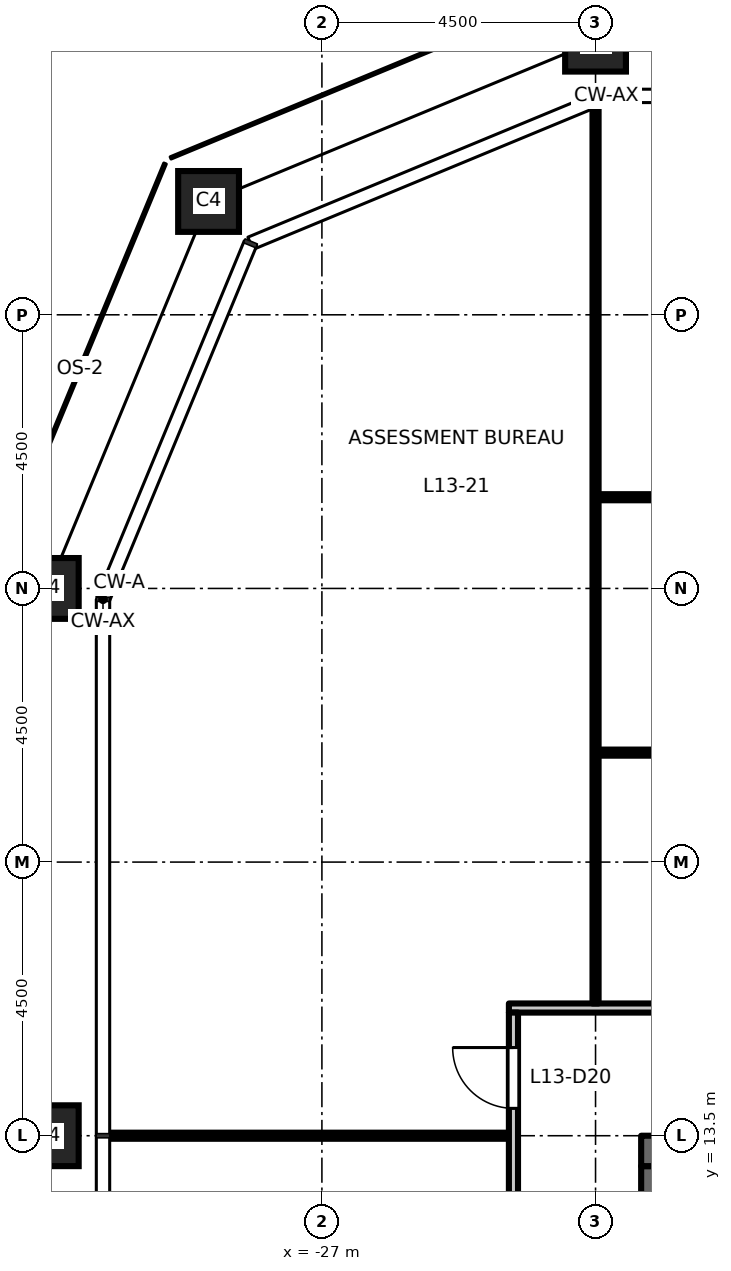
"""IFC4 building model, lengths in metres.
Left out: names, types, materials, properties, quantities, classifications, styles, units other than length and angle.
Written with IfcOpenShell. Run it as: python <this file> out.ifc"""

import sys

from ifc_helpers import new_model, si_unit, direction, frame, frame_2d, origin, origin_2d, place, context, subcontext, project, spatial, rectangle, hollow_rectangle, extrude, element, fill, save


model = new_model("IFC4")
c1 = context("Model", 3, precision=1e-05, world=origin(), true_north=direction((0.0, 1.0)))
c2 = subcontext(c1, "Body", "Model", "MODEL_VIEW")
j1 = project(units=[si_unit("LENGTHUNIT", "METRE"), si_unit("PLANEANGLEUNIT", "RADIAN")], contexts=[c1])
p1 = place(None, origin())
s1 = spatial("IfcSite", under=j1, at=p1, CompositionType="ELEMENT")
p2 = place(p1, origin())
s2 = spatial("IfcBuilding", under=s1, at=p2, CompositionType="ELEMENT")
p3 = place(p2, frame((0.0, 0.0, 62.7)))
s3 = spatial("IfcBuildingStorey", under=s2, at=p3, CompositionType="ELEMENT", Elevation=62.7)
for number, where, z_axis, x_axis in (
    (1, (-22.5, 31.5, 0.0), (0.0, 0.0, 1.0), (1.0, 0.0, 0.0)),
    (2, (-28.864, 28.864, 0.0), (0.0, 0.0, 1.0), (1.0, 0.0, 0.0)),
    (3, (-31.5, 22.5, 0.0), (0.0, 0.0, 1.0), (1.0, 0.0, 0.0)),
    (4, (-31.5, 13.5, 0.0), (0.0, 0.0, 1.0), (1.0, 0.0, 0.0)),
):
    element("IfcColumn", number, at=place(p3, frame(where, z_axis=z_axis, x_axis=x_axis)), inside=s3, PredefinedType="COLUMN", context=c2, shape_type="SweptSolid", body=[
        extrude(hollow_rectangle(XDim=1.0, YDim=1.0, WallThickness=0.06, at=origin_2d()), origin(), (0.0, 0.0, 1.0), 4.5),
    ])
p4 = place(p3, frame((-21.5, -13.0, 0.0), z_axis=(0.0, 0.0, 1.0), x_axis=(0.0, 1.0, 0.0)))
e5 = element("IfcWall", 5, at=p4, inside=s3, PredefinedType="SHEAR", context=c2, shape_type="SweptSolid", body=[
    extrude(rectangle(XDim=26.0, YDim=0.5, at=frame_2d((13.0, 0.0))), origin(), (0.0, 0.0, 1.0), 4.35),
])
p5 = place(p4, frame((16.825, 0.0, 0.0)))
e6 = element("IfcOpeningElement", 6, at=p5, cuts=e5, PredefinedType="OPENING", context=c2, shape_type="SweptSolid", body=[
    extrude(rectangle(XDim=1.8, YDim=2.1, at=frame_2d((0.9, 1.05))), frame((0.0, 0.26, 0.0), z_axis=(0.0, -1.0, 0.0), x_axis=(1.0, 0.0, 0.0)), (0.0, 0.0, 1.0), 0.52),
])
p6 = place(p4, frame((7.375, 0.0, 0.0)))
e7 = element("IfcOpeningElement", 7, at=p6, cuts=e5, PredefinedType="OPENING", context=c2, shape_type="SweptSolid", body=[
    extrude(rectangle(XDim=1.8, YDim=2.1, at=frame_2d((0.9, 1.05))), frame((0.0, 0.26, 0.0), z_axis=(0.0, -1.0, 0.0), x_axis=(1.0, 0.0, 0.0)), (0.0, 0.0, 1.0), 0.52),
])
p7 = place(p4, frame((23.4, 0.0, 0.0)))
e8 = element("IfcOpeningElement", 8, at=p7, cuts=e5, PredefinedType="OPENING", context=c2, shape_type="SweptSolid", body=[
    extrude(rectangle(XDim=0.9, YDim=2.1, at=frame_2d((0.45, 1.05))), frame((0.0, 0.26, 0.0), z_axis=(0.0, -1.0, 0.0), x_axis=(1.0, 0.0, 0.0)), (0.0, 0.0, 1.0), 0.52),
])
p8 = place(p3, frame((-8.25, 13.25, 0.0), z_axis=(0.0, 0.0, 1.0), x_axis=(-1.0, 0.0, 0.0)))
e9 = element("IfcWall", 9, at=p8, inside=s3, PredefinedType="SHEAR", context=c2, shape_type="SweptSolid", body=[
    extrude(rectangle(XDim=13.5, YDim=0.5, at=frame_2d((6.75, 0.0))), origin(), (0.0, 0.0, 1.0), 4.35),
])
p9 = place(p3, frame((-30.51, 13.5, 0.0), z_axis=(0.0, 0.0, 1.0), x_axis=(1.0, 0.0, 0.0)))
e10 = element("IfcWall", 10, at=p9, inside=s3, PredefinedType="PARTITIONING", context=c2, shape_type="SweptSolid", body=[
    extrude(rectangle(XDim=6.585, YDim=0.1, at=frame_2d((3.292, 0.0))), origin(), (0.0, 0.0, 1.0), 3.35),
])
p10 = place(p3, frame((-23.925, 15.6, 0.0), z_axis=(0.0, 0.0, 1.0), x_axis=(1.0, 0.0, 0.0)))
e11 = element("IfcWall", 11, at=p10, inside=s3, PredefinedType="PARTITIONING", context=c2, shape_type="SweptSolid", body=[
    extrude(rectangle(XDim=47.85, YDim=0.15, at=frame_2d((23.925, 0.0))), origin(), (0.0, 0.0, 1.0), 4.35),
])
p11 = place(p10, frame((5.525, 0.0, 0.0)))
e12 = element("IfcOpeningElement", 12, at=p11, cuts=e11, PredefinedType="OPENING", context=c2, shape_type="SweptSolid", body=[
    extrude(rectangle(XDim=1.0, YDim=2.1, at=frame_2d((0.5, 1.05))), frame((0.0, 0.085, 0.0), z_axis=(0.0, -1.0, 0.0), x_axis=(1.0, 0.0, 0.0)), (0.0, 0.0, 1.0), 0.17),
])
p12 = place(p10, frame((14.525, 0.0, 0.0)))
e13 = element("IfcOpeningElement", 13, at=p12, cuts=e11, PredefinedType="OPENING", context=c2, shape_type="SweptSolid", body=[
    extrude(rectangle(XDim=1.0, YDim=2.1, at=frame_2d((0.5, 1.05))), frame((0.0, 0.085, 0.0), z_axis=(0.0, -1.0, 0.0), x_axis=(1.0, 0.0, 0.0)), (0.0, 0.0, 1.0), 0.17),
])
p13 = place(p10, frame((23.525, 0.0, 0.0)))
e14 = element("IfcOpeningElement", 14, at=p13, cuts=e11, PredefinedType="OPENING", context=c2, shape_type="SweptSolid", body=[
    extrude(rectangle(XDim=1.0, YDim=2.1, at=frame_2d((0.5, 1.05))), frame((0.0, 0.085, 0.0), z_axis=(0.0, -1.0, 0.0), x_axis=(1.0, 0.0, 0.0)), (0.0, 0.0, 1.0), 0.17),
])
p14 = place(p10, frame((32.525, 0.0, 0.0)))
e15 = element("IfcOpeningElement", 15, at=p14, cuts=e11, PredefinedType="OPENING", context=c2, shape_type="SweptSolid", body=[
    extrude(rectangle(XDim=1.0, YDim=2.1, at=frame_2d((0.5, 1.05))), frame((0.0, 0.085, 0.0), z_axis=(0.0, -1.0, 0.0), x_axis=(1.0, 0.0, 0.0)), (0.0, 0.0, 1.0), 0.17),
])
p15 = place(p10, frame((41.525, 0.0, 0.0)))
e16 = element("IfcOpeningElement", 16, at=p15, cuts=e11, PredefinedType="OPENING", context=c2, shape_type="SweptSolid", body=[
    extrude(rectangle(XDim=1.0, YDim=2.1, at=frame_2d((0.5, 1.05))), frame((0.0, 0.085, 0.0), z_axis=(0.0, -1.0, 0.0), x_axis=(1.0, 0.0, 0.0)), (0.0, 0.0, 1.0), 0.17),
])
p16 = place(p3, frame((-22.45, 19.8, 0.0), z_axis=(0.0, 0.0, 1.0), x_axis=(1.0, 0.0, 0.0)))
e17 = element("IfcWall", 17, at=p16, inside=s3, PredefinedType="PARTITIONING", context=c2, shape_type="SweptSolid", body=[
    extrude(rectangle(XDim=8.9, YDim=0.1, at=frame_2d((4.45, 0.0))), origin(), (0.0, 0.0, 1.0), 4.35),
])
p17 = place(p16, frame((4.05, 0.0, 0.0)))
e18 = element("IfcOpeningElement", 18, at=p17, cuts=e17, PredefinedType="OPENING", context=c2, shape_type="SweptSolid", body=[
    extrude(rectangle(XDim=1.0, YDim=2.1, at=frame_2d((0.5, 1.05))), frame((0.0, 0.06, 0.0), z_axis=(0.0, -1.0, 0.0), x_axis=(1.0, 0.0, 0.0)), (0.0, 0.0, 1.0), 0.12),
])
p18 = place(p3, frame((-22.45, 24.0, 0.0), z_axis=(0.0, 0.0, 1.0), x_axis=(1.0, 0.0, 0.0)))
e19 = element("IfcWall", 19, at=p18, inside=s3, PredefinedType="PARTITIONING", context=c2, shape_type="SweptSolid", body=[
    extrude(rectangle(XDim=8.9, YDim=0.1, at=frame_2d((4.45, 0.0))), origin(), (0.0, 0.0, 1.0), 3.85),
])
p19 = place(p18, frame((4.05, 0.0, 0.0)))
e20 = element("IfcOpeningElement", 20, at=p19, cuts=e19, PredefinedType="OPENING", context=c2, shape_type="SweptSolid", body=[
    extrude(rectangle(XDim=1.0, YDim=2.1, at=frame_2d((0.5, 1.05))), frame((0.0, 0.06, 0.0), z_axis=(0.0, -1.0, 0.0), x_axis=(1.0, 0.0, 0.0)), (0.0, 0.0, 1.0), 0.12),
])
p20 = place(p3, frame((-23.85, -15.525, 0.0), z_axis=(0.0, 0.0, 1.0), x_axis=(0.0, 1.0, 0.0)))
e21 = element("IfcWall", 21, at=p20, inside=s3, PredefinedType="PARTITIONING", context=c2, shape_type="SweptSolid", body=[
    extrude(rectangle(XDim=31.05, YDim=0.15, at=frame_2d((15.525, 0.0))), origin(), (0.0, 0.0, 1.0), 4.35),
])
p21 = place(p20, frame((29.475, 0.0, 0.0)))
e22 = element("IfcOpeningElement", 22, at=p21, cuts=e21, PredefinedType="OPENING", context=c2, shape_type="SweptSolid", body=[
    extrude(rectangle(XDim=1.0, YDim=2.1, at=frame_2d((0.5, 1.05))), frame((0.0, 0.085, 0.0), z_axis=(0.0, -1.0, 0.0), x_axis=(1.0, 0.0, 0.0)), (0.0, 0.0, 1.0), 0.17),
])
p22 = place(p20, frame((0.375, 0.0, 0.0)))
e23 = element("IfcOpeningElement", 23, at=p22, cuts=e21, PredefinedType="OPENING", context=c2, shape_type="SweptSolid", body=[
    extrude(rectangle(XDim=1.0, YDim=2.1, at=frame_2d((0.5, 1.05))), frame((0.0, 0.085, 0.0), z_axis=(0.0, -1.0, 0.0), x_axis=(1.0, 0.0, 0.0)), (0.0, 0.0, 1.0), 0.17),
])
p23 = place(p20, frame((6.125, 0.0, 0.0)))
e24 = element("IfcOpeningElement", 24, at=p23, cuts=e21, PredefinedType="OPENING", context=c2, shape_type="SweptSolid", body=[
    extrude(rectangle(XDim=1.0, YDim=2.1, at=frame_2d((0.5, 1.05))), frame((0.0, 0.085, 0.0), z_axis=(0.0, -1.0, 0.0), x_axis=(1.0, 0.0, 0.0)), (0.0, 0.0, 1.0), 0.17),
])
p24 = place(p20, frame((15.125, 0.0, 0.0)))
e25 = element("IfcOpeningElement", 25, at=p24, cuts=e21, PredefinedType="OPENING", context=c2, shape_type="SweptSolid", body=[
    extrude(rectangle(XDim=1.0, YDim=2.1, at=frame_2d((0.5, 1.05))), frame((0.0, 0.085, 0.0), z_axis=(0.0, -1.0, 0.0), x_axis=(1.0, 0.0, 0.0)), (0.0, 0.0, 1.0), 0.17),
])
p25 = place(p20, frame((24.125, 0.0, 0.0)))
e26 = element("IfcOpeningElement", 26, at=p25, cuts=e21, PredefinedType="OPENING", context=c2, shape_type="SweptSolid", body=[
    extrude(rectangle(XDim=1.0, YDim=2.1, at=frame_2d((0.5, 1.05))), frame((0.0, 0.085, 0.0), z_axis=(0.0, -1.0, 0.0), x_axis=(1.0, 0.0, 0.0)), (0.0, 0.0, 1.0), 0.17),
])
p26 = place(p3, frame((-22.5, 15.675, 0.0), z_axis=(0.0, 0.0, 1.0), x_axis=(0.0, 1.0, 0.0)))
e27 = element("IfcWall", 27, at=p26, inside=s3, PredefinedType="PARTITIONING", context=c2, shape_type="SweptSolid", body=[
    extrude(rectangle(XDim=14.753, YDim=0.1, at=frame_2d((7.376, 0.0))), origin(), (0.0, 0.0, 1.0), 3.35),
])
p27 = place(p21, origin())
e28 = element("IfcDoor", 28, at=p27, inside=s3, OperationType="SINGLE_SWING_RIGHT", PredefinedType="DOOR", context=c2, shape_type="SweptSolid", body=[
    extrude(rectangle(XDim=1.0, YDim=2.1, at=frame_2d((0.5, 1.05))), frame((0.0, 0.025, 0.0), z_axis=(0.0, -1.0, 0.0), x_axis=(1.0, 0.0, 0.0)), (0.0, 0.0, 1.0), 0.05),
])
fill(e22, e28)
save(model, sys.argv[1])
